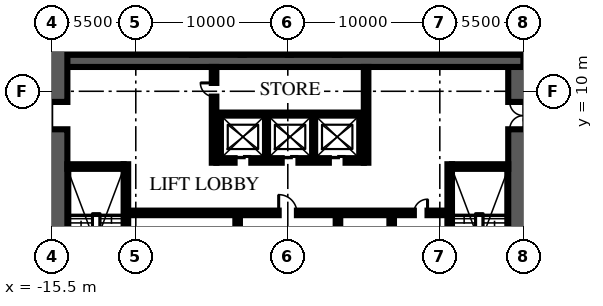
"""IFC4 building model, lengths in metres.
Left out: names, types, materials, properties, quantities, classifications, styles, units other than length and angle.
Written with IfcOpenShell. Run it as: python <this file> out.ifc"""

import sys

from ifc_helpers import new_model, si_unit, direction, frame, frame_2d, origin, place, context, subcontext, project, spatial, rectangle, extrude, element, fill, save


model = new_model("IFC4")
c1 = context("Model", 3, precision=1e-05, world=origin(), true_north=direction((0.0, 1.0)))
c2 = subcontext(c1, "Body", "Model", "MODEL_VIEW")
j1 = project(units=[si_unit("LENGTHUNIT", "METRE"), si_unit("PLANEANGLEUNIT", "RADIAN")], contexts=[c1])
p1 = place(None, origin())
s1 = spatial("IfcSite", under=j1, at=p1, CompositionType="ELEMENT")
p2 = place(p1, origin())
s2 = spatial("IfcBuilding", under=s1, at=p2, CompositionType="ELEMENT")
p3 = place(p2, origin())
s3 = spatial("IfcBuildingStorey", under=s2, at=p3, CompositionType="ELEMENT", Elevation=0.0)
p4 = place(p3, frame((15.5, -15.5, -0.3), z_axis=(0.0, 0.0, 1.0), x_axis=(0.0, 1.0, 0.0)))
e1 = element("IfcWall", 1, at=p4, inside=s3, PredefinedType="SHEAR", context=c2, shape_type="SweptSolid", body=[
    extrude(rectangle(XDim=31.0, YDim=2.0, at=frame_2d((15.5, 0.0))), origin(), (0.0, 0.0, 1.0), 6.0),
])
p5 = place(p4, frame((6.5, 0.0, 0.3)))
e2 = element("IfcOpeningElement", 2, at=p5, cuts=e1, PredefinedType="OPENING", context=c2, shape_type="SweptSolid", body=[
    extrude(rectangle(XDim=1.2, YDim=2.1, at=frame_2d((0.6, 1.05))), frame((0.0, 1.01, 0.0), z_axis=(0.0, -1.0, 0.0), x_axis=(1.0, 0.0, 0.0)), (0.0, 0.0, 1.0), 2.02),
])
p6 = place(p4, frame((23.0, 0.0, 0.3)))
e3 = element("IfcOpeningElement", 3, at=p6, cuts=e1, PredefinedType="OPENING", context=c2, shape_type="SweptSolid", body=[
    extrude(rectangle(XDim=1.8, YDim=2.1, at=frame_2d((0.9, 1.05))), frame((0.0, 1.01, 0.0), z_axis=(0.0, -1.0, 0.0), x_axis=(1.0, 0.0, 0.0)), (0.0, 0.0, 1.0), 2.02),
])
p7 = place(p3, frame((-15.5, 12.0, -0.3), z_axis=(0.0, 0.0, 1.0), x_axis=(1.0, 0.0, 0.0)))
e4 = element("IfcWall", 4, at=p7, inside=s3, PredefinedType="SHEAR", context=c2, shape_type="SweptSolid", body=[
    extrude(rectangle(XDim=31.0, YDim=0.8, at=frame_2d((15.5, 0.0))), origin(), (0.0, 0.0, 1.0), 6.0),
])
p8 = place(p3, frame((-15.5, -15.5, -0.3), z_axis=(0.0, 0.0, 1.0), x_axis=(0.0, 1.0, 0.0)))
e5 = element("IfcWall", 5, at=p8, inside=s3, PredefinedType="SHEAR", context=c2, shape_type="SweptSolid", body=[
    extrude(rectangle(XDim=31.0, YDim=2.0, at=frame_2d((15.5, 0.0))), origin(), (0.0, 0.0, 1.0), 6.0),
])
p9 = place(p8, frame((6.5, 0.0, 0.3)))
e6 = element("IfcOpeningElement", 6, at=p9, cuts=e5, PredefinedType="OPENING", context=c2, shape_type="SweptSolid", body=[
    extrude(rectangle(XDim=1.2, YDim=2.1, at=frame_2d((0.6, 1.05))), frame((0.0, 1.01, 0.0), z_axis=(0.0, -1.0, 0.0), x_axis=(1.0, 0.0, 0.0)), (0.0, 0.0, 1.0), 2.02),
])
p10 = place(p8, frame((23.0, 0.0, 0.3)))
e7 = element("IfcOpeningElement", 7, at=p10, cuts=e5, PredefinedType="OPENING", context=c2, shape_type="SweptSolid", body=[
    extrude(rectangle(XDim=1.8, YDim=2.1, at=frame_2d((0.9, 1.05))), frame((0.0, 1.01, 0.0), z_axis=(0.0, -1.0, 0.0), x_axis=(1.0, 0.0, 0.0)), (0.0, 0.0, 1.0), 2.02),
])
p11 = place(p3, frame((-10.65, -4.9, 0.0), z_axis=(0.0, 0.0, 1.0), x_axis=(0.0, 1.0, 0.0)))
e8 = element("IfcWall", 8, at=p11, inside=s3, PredefinedType="SOLIDWALL", context=c2, shape_type="SweptSolid", body=[
    extrude(rectangle(XDim=10.1, YDim=0.3, at=frame_2d((5.05, 0.0))), origin(), (0.0, 0.0, 1.0), 5.7),
])
p12 = place(p3, frame((-14.5, 5.05, 0.0), z_axis=(0.0, 0.0, 1.0), x_axis=(1.0, 0.0, 0.0)))
e9 = element("IfcWall", 9, at=p12, inside=s3, PredefinedType="SOLIDWALL", context=c2, shape_type="SweptSolid", body=[
    extrude(rectangle(XDim=3.7, YDim=0.3, at=frame_2d((1.85, 0.0))), origin(), (0.0, 0.0, 1.0), 5.7),
])
p13 = place(p3, frame((10.65, -4.9, 0.0), z_axis=(0.0, 0.0, 1.0), x_axis=(0.0, 1.0, 0.0)))
e10 = element("IfcWall", 10, at=p13, inside=s3, PredefinedType="SOLIDWALL", context=c2, shape_type="SweptSolid", body=[
    extrude(rectangle(XDim=10.1, YDim=0.3, at=frame_2d((5.05, 0.0))), origin(), (0.0, 0.0, 1.0), 5.7),
])
p14 = place(p3, frame((14.5, 5.05, 0.0), z_axis=(0.0, 0.0, 1.0), x_axis=(-1.0, 0.0, 0.0)))
e11 = element("IfcWall", 11, at=p14, inside=s3, PredefinedType="SOLIDWALL", context=c2, shape_type="SweptSolid", body=[
    extrude(rectangle(XDim=3.7, YDim=0.3, at=frame_2d((1.85, 0.0))), origin(), (0.0, 0.0, 1.0), 5.7),
])
p15 = place(p3, frame((-4.7, 5.45, 0.0), z_axis=(0.0, 0.0, 1.0), x_axis=(1.0, 0.0, 0.0)))
e12 = element("IfcWall", 12, at=p15, inside=s3, PredefinedType="PARTITIONING", context=c2, shape_type="SweptSolid", body=[
    extrude(rectangle(XDim=9.7, YDim=0.3, at=frame_2d((4.85, 0.0))), origin(), (0.0, 0.0, 1.0), 5.7),
])
p16 = place(p15, frame((1.2, 0.0, 0.0)))
e13 = element("IfcOpeningElement", 13, at=p16, cuts=e12, PredefinedType="OPENING", context=c2, shape_type="SweptSolid", body=[
    extrude(rectangle(XDim=1.1, YDim=2.1, at=frame_2d((0.55, 1.05))), frame((0.0, 0.16, 0.0), z_axis=(0.0, -1.0, 0.0), x_axis=(1.0, 0.0, 0.0)), (0.0, 0.0, 1.0), 0.32),
])
p17 = place(p15, frame((4.3, 0.0, 0.0)))
e14 = element("IfcOpeningElement", 14, at=p17, cuts=e12, PredefinedType="OPENING", context=c2, shape_type="SweptSolid", body=[
    extrude(rectangle(XDim=1.1, YDim=2.1, at=frame_2d((0.55, 1.05))), frame((0.0, 0.16, 0.0), z_axis=(0.0, -1.0, 0.0), x_axis=(1.0, 0.0, 0.0)), (0.0, 0.0, 1.0), 0.32),
])
p18 = place(p15, frame((7.4, 0.0, 0.0)))
e15 = element("IfcOpeningElement", 15, at=p18, cuts=e12, PredefinedType="OPENING", context=c2, shape_type="SweptSolid", body=[
    extrude(rectangle(XDim=1.1, YDim=2.1, at=frame_2d((0.55, 1.05))), frame((0.0, 0.16, 0.0), z_axis=(0.0, -1.0, 0.0), x_axis=(1.0, 0.0, 0.0)), (0.0, 0.0, 1.0), 0.32),
])
p19 = place(p3, frame((-4.7, 8.5, 0.0), z_axis=(0.0, 0.0, 1.0), x_axis=(1.0, 0.0, 0.0)))
e16 = element("IfcWall", 16, at=p19, inside=s3, PredefinedType="PARTITIONING", context=c2, shape_type="SweptSolid", body=[
    extrude(rectangle(XDim=9.7, YDim=0.2, at=frame_2d((4.85, 0.0))), origin(), (0.0, 0.0, 1.0), 5.7),
])
for number, where, z_axis, x_axis in (
    (17, (-4.55, 5.6, 0.0), (0.0, 0.0, 1.0), (0.0, 1.0, 0.0)),
    (18, (4.85, 5.6, 0.0), (0.0, 0.0, 1.0), (0.0, 1.0, 0.0)),
):
    element("IfcWall", number, at=place(p3, frame(where, z_axis=z_axis, x_axis=x_axis)), inside=s3, PredefinedType="PARTITIONING", context=c2, shape_type="SweptSolid", body=[
        extrude(rectangle(XDim=2.8, YDim=0.3, at=frame_2d((1.4, 0.0))), origin(), (0.0, 0.0, 1.0), 5.7),
    ])
for number, where, z_axis, x_axis in (
    (19, (-1.4, 5.6, 0.0), (0.0, 0.0, 1.0), (0.0, 1.0, 0.0)),
    (20, (1.7, 5.6, 0.0), (0.0, 0.0, 1.0), (0.0, 1.0, 0.0)),
):
    element("IfcWall", number, at=place(p3, frame(where, z_axis=z_axis, x_axis=x_axis)), inside=s3, PredefinedType="PARTITIONING", context=c2, shape_type="SweptSolid", body=[
        extrude(rectangle(XDim=2.8, YDim=0.2, at=frame_2d((1.4, 0.0))), origin(), (0.0, 0.0, 1.0), 5.7),
    ])
for number, where, z_axis, x_axis in (
    (21, (-6.15, 12.4, 0.0), (0.0, 0.0, 1.0), (0.0, 1.0, 0.0)),
    (22, (3.25, 12.4, 0.0), (0.0, 0.0, 1.0), (0.0, 1.0, 0.0)),
):
    element("IfcWall", number, at=place(p3, frame(where, z_axis=z_axis, x_axis=x_axis)), inside=s3, PredefinedType="PARTITIONING", context=c2, shape_type="SweptSolid", body=[
        extrude(rectangle(XDim=2.1, YDim=0.3, at=frame_2d((1.05, 0.0))), origin(), (0.0, 0.0, 1.0), 5.7),
    ])
for number, where, z_axis, x_axis in (
    (23, (-3.0, 12.4, 0.0), (0.0, 0.0, 1.0), (0.0, 1.0, 0.0)),
    (24, (0.1, 12.4, 0.0), (0.0, 0.0, 1.0), (0.0, 1.0, 0.0)),
):
    element("IfcWall", number, at=place(p3, frame(where, z_axis=z_axis, x_axis=x_axis)), inside=s3, PredefinedType="PARTITIONING", context=c2, shape_type="SweptSolid", body=[
        extrude(rectangle(XDim=2.1, YDim=0.2, at=frame_2d((1.05, 0.0))), origin(), (0.0, 0.0, 1.0), 5.7),
    ])
p20 = place(p3, frame((-10.65, 2.0, 0.0), z_axis=(0.0, 0.0, 1.0), x_axis=(1.0, 0.0, 0.0)))
e25 = element("IfcWall", 25, at=p20, inside=s3, PredefinedType="PARTITIONING", context=c2, shape_type="SweptSolid", body=[
    extrude(rectangle(XDim=21.3, YDim=0.3, at=frame_2d((10.65, 0.0))), origin(), (0.0, 0.0, 1.0), 5.7),
])
p21 = place(p20, frame((10.05, 0.0, 0.0)))
e26 = element("IfcOpeningElement", 26, at=p21, cuts=e25, PredefinedType="OPENING", context=c2, shape_type="SweptSolid", body=[
    extrude(rectangle(XDim=1.2, YDim=2.1, at=frame_2d((0.6, 1.05))), frame((0.0, 0.16, 0.0), z_axis=(0.0, -1.0, 0.0), x_axis=(1.0, 0.0, 0.0)), (0.0, 0.0, 1.0), 0.32),
])
p22 = place(p20, frame((18.942, 0.0, 0.0)))
e27 = element("IfcOpeningElement", 27, at=p22, cuts=e25, PredefinedType="OPENING", context=c2, shape_type="SweptSolid", body=[
    extrude(rectangle(XDim=0.9, YDim=2.1, at=frame_2d((0.45, 1.05))), frame((0.0, 0.16, 0.0), z_axis=(0.0, -1.0, 0.0), x_axis=(1.0, 0.0, 0.0)), (0.0, 0.0, 1.0), 0.32),
])
p23 = place(p3, frame((-3.3, -6.65, 0.0), z_axis=(0.0, 0.0, 1.0), x_axis=(0.0, 1.0, 0.0)))
e28 = element("IfcWall", 28, at=p23, inside=s3, PredefinedType="PARTITIONING", context=c2, shape_type="SweptSolid", body=[
    extrude(rectangle(XDim=8.65, YDim=0.3, at=frame_2d((4.325, 0.0))), origin(), (0.0, 0.0, 1.0), 5.7),
])
p24 = place(p23, frame((1.75, 0.0, 0.0)))
e29 = element("IfcOpeningElement", 29, at=p24, cuts=e28, PredefinedType="OPENING", context=c2, shape_type="SweptSolid", body=[
    extrude(rectangle(XDim=0.9, YDim=2.1, at=frame_2d((0.45, 1.05))), frame((0.0, 0.16, 0.0), z_axis=(0.0, -1.0, 0.0), x_axis=(1.0, 0.0, 0.0)), (0.0, 0.0, 1.0), 0.32),
])
p25 = place(p23, frame((6.075, 0.0, 0.0)))
e30 = element("IfcOpeningElement", 30, at=p25, cuts=e28, PredefinedType="OPENING", context=c2, shape_type="SweptSolid", body=[
    extrude(rectangle(XDim=0.9, YDim=2.1, at=frame_2d((0.45, 1.05))), frame((0.0, 0.16, 0.0), z_axis=(0.0, -1.0, 0.0), x_axis=(1.0, 0.0, 0.0)), (0.0, 0.0, 1.0), 0.32),
])
p26 = place(p3, frame((3.3, -6.65, 0.0), z_axis=(0.0, 0.0, 1.0), x_axis=(0.0, 1.0, 0.0)))
e31 = element("IfcWall", 31, at=p26, inside=s3, PredefinedType="PARTITIONING", context=c2, shape_type="SweptSolid", body=[
    extrude(rectangle(XDim=8.65, YDim=0.3, at=frame_2d((4.325, 0.0))), origin(), (0.0, 0.0, 1.0), 5.7),
])
p27 = place(p26, frame((3.875, 0.0, 0.0)))
e32 = element("IfcOpeningElement", 32, at=p27, cuts=e31, PredefinedType="OPENING", context=c2, shape_type="SweptSolid", body=[
    extrude(rectangle(XDim=0.9, YDim=2.1, at=frame_2d((0.45, 1.05))), frame((0.0, 0.16, 0.0), z_axis=(0.0, -1.0, 0.0), x_axis=(1.0, 0.0, 0.0)), (0.0, 0.0, 1.0), 0.32),
])
p28 = place(p3, frame((6.834, -6.65, 0.0), z_axis=(0.0, 0.0, 1.0), x_axis=(0.0, 1.0, 0.0)))
e33 = element("IfcWall", 33, at=p28, inside=s3, PredefinedType="PARTITIONING", context=c2, shape_type="SweptSolid", body=[
    extrude(rectangle(XDim=8.65, YDim=0.3, at=frame_2d((4.325, 0.0))), origin(), (0.0, 0.0, 1.0), 5.7),
])
p29 = place(p3, frame((-4.85, 5.3, 0.0), z_axis=(0.0, 0.0, 1.0), x_axis=(0.0, 1.0, 0.0)))
e34 = element("IfcWall", 34, at=p29, inside=s3, PredefinedType="PARTITIONING", context=c2, shape_type="SweptSolid", body=[
    extrude(rectangle(XDim=6.3, YDim=0.3, at=frame_2d((3.15, 0.0))), origin(), (0.0, 0.0, 1.0), 5.7),
])
p30 = place(p29, frame((4.35, 0.0, 0.0)))
e35 = element("IfcOpeningElement", 35, at=p30, cuts=e34, PredefinedType="OPENING", context=c2, shape_type="SweptSolid", body=[
    extrude(rectangle(XDim=0.9, YDim=2.1, at=frame_2d((0.45, 1.05))), frame((0.0, 0.16, 0.0), z_axis=(0.0, -1.0, 0.0), x_axis=(1.0, 0.0, 0.0)), (0.0, 0.0, 1.0), 0.32),
])
p31 = place(p3, frame((5.15, 5.3, 0.0), z_axis=(0.0, 0.0, 1.0), x_axis=(0.0, 1.0, 0.0)))
e36 = element("IfcWall", 36, at=p31, inside=s3, PredefinedType="PARTITIONING", context=c2, shape_type="SweptSolid", body=[
    extrude(rectangle(XDim=6.3, YDim=0.3, at=frame_2d((3.15, 0.0))), origin(), (0.0, 0.0, 1.0), 5.7),
])
p32 = place(p10, origin())
e37 = element("IfcDoor", 37, at=p32, inside=s3, OperationType="DOUBLE_DOOR_SINGLE_SWING", PredefinedType="DOOR", context=c2, shape_type="SweptSolid", body=[
    extrude(rectangle(XDim=1.8, YDim=2.1, at=frame_2d((0.9, 1.05))), frame((0.0, 0.025, 0.0), z_axis=(0.0, -1.0, 0.0), x_axis=(1.0, 0.0, 0.0)), (0.0, 0.0, 1.0), 0.05),
])
fill(e7, e37)
p33 = place(p6, origin())
e38 = element("IfcDoor", 38, at=p33, inside=s3, OperationType="DOUBLE_DOOR_SINGLE_SWING", PredefinedType="DOOR", context=c2, shape_type="SweptSolid", body=[
    extrude(rectangle(XDim=1.8, YDim=2.1, at=frame_2d((0.9, 1.05))), frame((0.0, 0.025, 0.0), z_axis=(0.0, -1.0, 0.0), x_axis=(1.0, 0.0, 0.0)), (0.0, 0.0, 1.0), 0.05),
])
fill(e3, e38)
p34 = place(p16, origin())
e39 = element("IfcDoor", 39, at=p34, inside=s3, OperationType="DOUBLE_DOOR_SLIDING", PredefinedType="DOOR", context=c2, shape_type="SweptSolid", body=[
    extrude(rectangle(XDim=1.1, YDim=2.1, at=frame_2d((0.55, 1.05))), frame((0.0, 0.025, 0.0), z_axis=(0.0, -1.0, 0.0), x_axis=(1.0, 0.0, 0.0)), (0.0, 0.0, 1.0), 0.05),
])
fill(e13, e39)
p35 = place(p17, origin())
e40 = element("IfcDoor", 40, at=p35, inside=s3, OperationType="DOUBLE_DOOR_SLIDING", PredefinedType="DOOR", context=c2, shape_type="SweptSolid", body=[
    extrude(rectangle(XDim=1.1, YDim=2.1, at=frame_2d((0.55, 1.05))), frame((0.0, 0.025, 0.0), z_axis=(0.0, -1.0, 0.0), x_axis=(1.0, 0.0, 0.0)), (0.0, 0.0, 1.0), 0.05),
])
fill(e14, e40)
p36 = place(p18, origin())
e41 = element("IfcDoor", 41, at=p36, inside=s3, OperationType="DOUBLE_DOOR_SLIDING", PredefinedType="DOOR", context=c2, shape_type="SweptSolid", body=[
    extrude(rectangle(XDim=1.1, YDim=2.1, at=frame_2d((0.55, 1.05))), frame((0.0, 0.025, 0.0), z_axis=(0.0, -1.0, 0.0), x_axis=(1.0, 0.0, 0.0)), (0.0, 0.0, 1.0), 0.05),
])
fill(e15, e41)
p37 = place(p21, origin())
e42 = element("IfcDoor", 42, at=p37, inside=s3, OperationType="SINGLE_SWING_LEFT", PredefinedType="DOOR", context=c2, shape_type="SweptSolid", body=[
    extrude(rectangle(XDim=1.2, YDim=2.1, at=frame_2d((0.6, 1.05))), frame((0.0, 0.025, 0.0), z_axis=(0.0, -1.0, 0.0), x_axis=(1.0, 0.0, 0.0)), (0.0, 0.0, 1.0), 0.05),
])
fill(e26, e42)
p38 = place(p22, origin())
e43 = element("IfcDoor", 43, at=p38, inside=s3, OperationType="SINGLE_SWING_RIGHT", PredefinedType="DOOR", context=c2, shape_type="SweptSolid", body=[
    extrude(rectangle(XDim=0.9, YDim=2.1, at=frame_2d((0.45, 1.05))), frame((0.0, 0.025, 0.0), z_axis=(0.0, -1.0, 0.0), x_axis=(1.0, 0.0, 0.0)), (0.0, 0.0, 1.0), 0.05),
])
fill(e27, e43)
p39 = place(p30, origin())
e44 = element("IfcDoor", 44, at=p39, inside=s3, OperationType="SINGLE_SWING_RIGHT", PredefinedType="DOOR", context=c2, shape_type="SweptSolid", body=[
    extrude(rectangle(XDim=0.9, YDim=2.1, at=frame_2d((0.45, 1.05))), frame((0.0, 0.025, 0.0), z_axis=(0.0, -1.0, 0.0), x_axis=(1.0, 0.0, 0.0)), (0.0, 0.0, 1.0), 0.05),
])
fill(e35, e44)
save(model, sys.argv[1])
